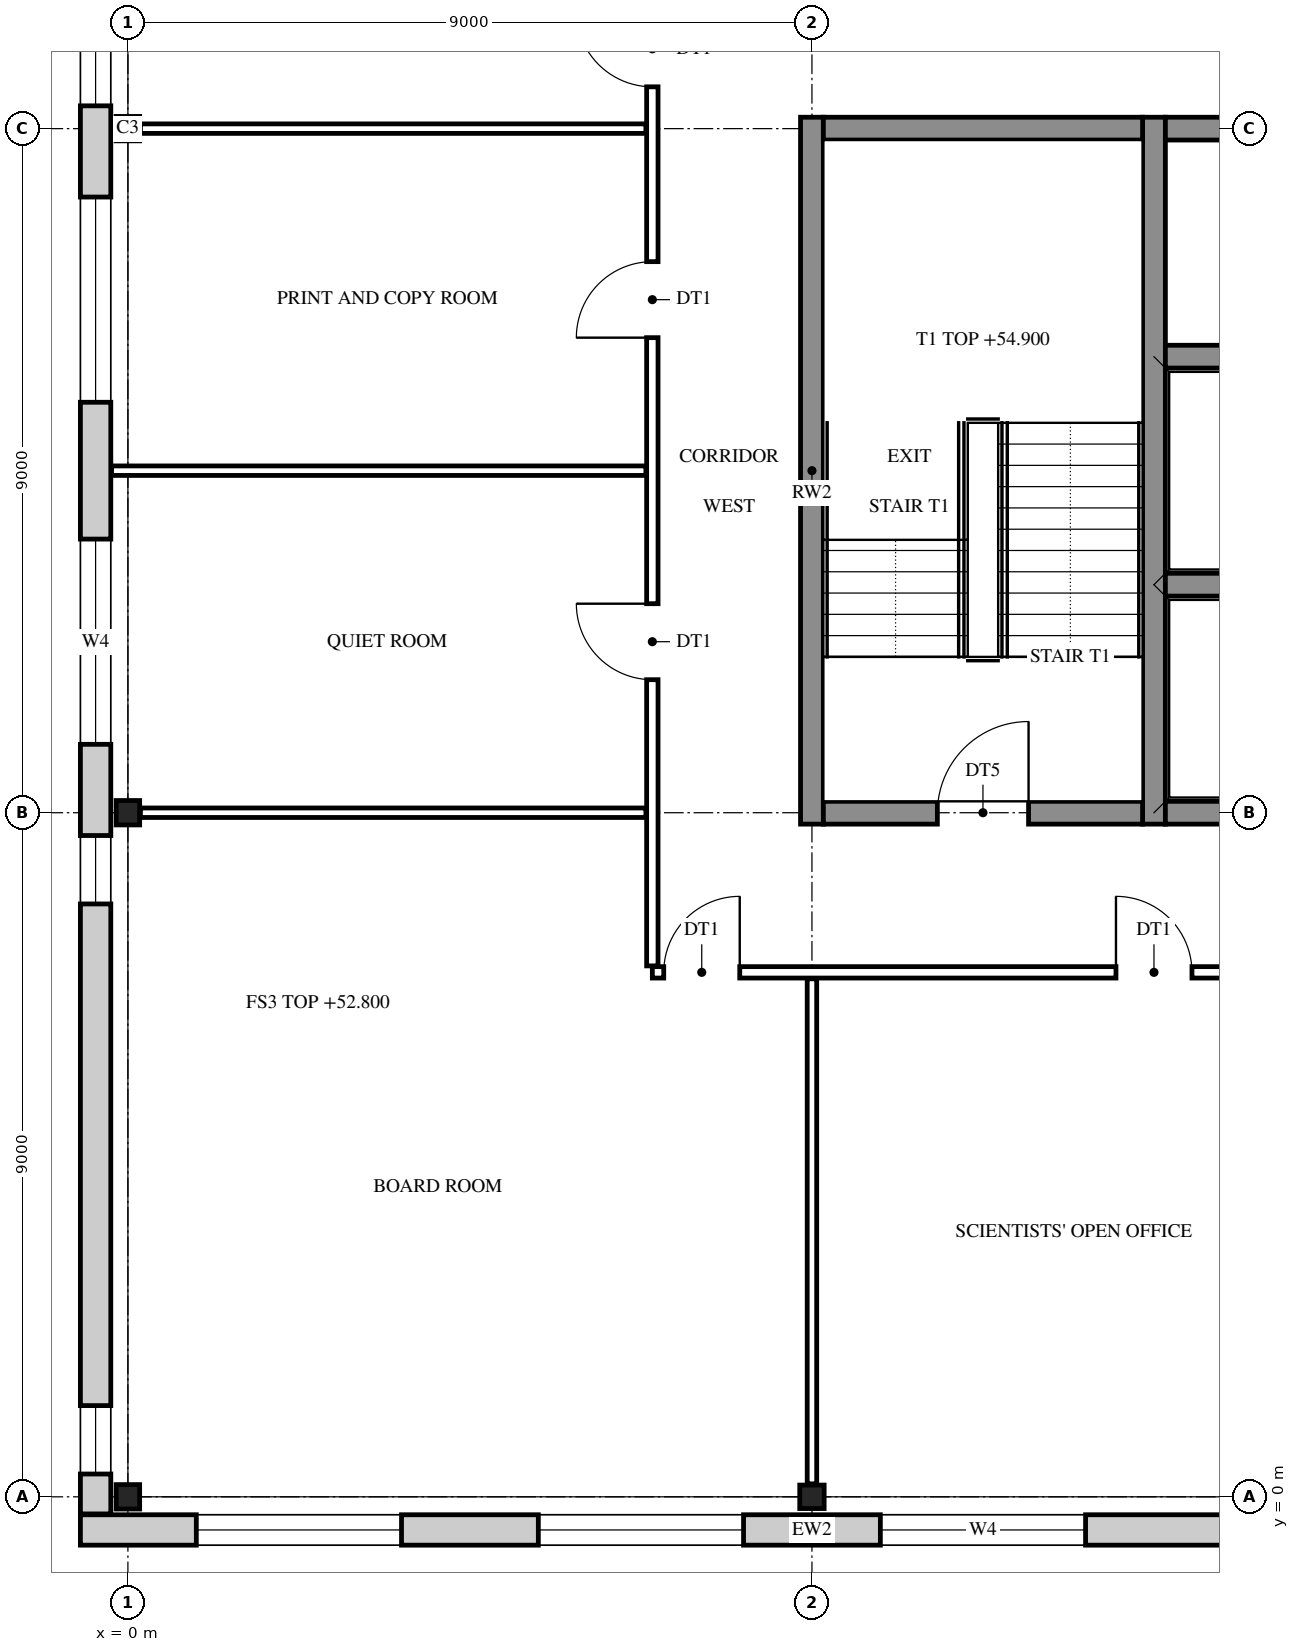
"""IFC4 building model, lengths in metres.
Left out: names, types, materials, properties, quantities, classifications, styles, units other than length and angle.
Written with IfcOpenShell. Run it as: python <this file> out.ifc"""

import sys

from ifc_helpers import new_model, si_unit, direction, frame, frame_2d, origin, origin_2d, place, context, subcontext, project, spatial, rectangle, i_section, extrude, element, fill, save


model = new_model("IFC4")
c1 = context("Model", 3, precision=1e-05, world=origin(), true_north=direction((0.0, 1.0)))
c2 = subcontext(c1, "Body", "Model", "MODEL_VIEW")
j1 = project(units=[si_unit("LENGTHUNIT", "METRE"), si_unit("PLANEANGLEUNIT", "RADIAN")], contexts=[c1])
p1 = place(None, origin())
s1 = spatial("IfcSite", under=j1, at=p1, CompositionType="ELEMENT")
p2 = place(p1, origin())
s2 = spatial("IfcBuilding", under=s1, at=p2, CompositionType="ELEMENT")
p3 = place(p2, frame((0.0, 0.0, 52.8)))
s3 = spatial("IfcBuildingStorey", under=s2, at=p3, CompositionType="ELEMENT", Elevation=52.8)
for number, where, z_axis, x_axis in (
    (1, (0.0, 0.0, 0.0), (0.0, 0.0, 1.0), (1.0, 0.0, 0.0)),
    (2, (0.0, 9.0, 0.0), (0.0, 0.0, 1.0), (1.0, 0.0, 0.0)),
    (3, (0.0, 18.0, 0.0), (0.0, 0.0, 1.0), (1.0, 0.0, 0.0)),
    (4, (9.0, 0.0, 0.0), (0.0, 0.0, 1.0), (0.0, 1.0, 0.0)),
):
    element("IfcColumn", number, at=place(p3, frame(where, z_axis=z_axis, x_axis=x_axis)), inside=s3, PredefinedType="COLUMN", context=c2, shape_type="SweptSolid", body=[
        extrude(i_section(OverallWidth=0.309, OverallDepth=0.321, WebThickness=0.014, FlangeThickness=0.022, FilletRadius=0.017, at=origin_2d()), origin(), (0.0, 0.0, 1.0), 4.2),
    ])
for number, where, z_axis, x_axis in (
    (5, (9.0, 8.85, 0.0), (0.0, 0.0, 1.0), (0.0, 1.0, 0.0)),
    (6, (13.5, 8.85, 0.0), (0.0, 0.0, 1.0), (0.0, 1.0, 0.0)),
):
    element("IfcWall", number, at=place(p3, frame(where, z_axis=z_axis, x_axis=x_axis)), inside=s3, PredefinedType="SHEAR", context=c2, shape_type="SweptSolid", body=[
        extrude(rectangle(XDim=9.3, YDim=0.3, at=frame_2d((4.65, 0.0))), origin(), (0.0, 0.0, 1.0), 4.2),
    ])
p4 = place(p3, frame((9.15, 9.0, 0.0), z_axis=(0.0, 0.0, 1.0), x_axis=(1.0, 0.0, 0.0)))
e7 = element("IfcWall", 7, at=p4, inside=s3, PredefinedType="SHEAR", context=c2, shape_type="SweptSolid", body=[
    extrude(rectangle(XDim=4.2, YDim=0.3, at=frame_2d((2.1, 0.0))), origin(), (0.0, 0.0, 1.0), 4.2),
])
p5 = place(p4, frame((1.5, 0.0, 0.0)))
e8 = element("IfcOpeningElement", 8, at=p5, cuts=e7, PredefinedType="OPENING", context=c2, shape_type="SweptSolid", body=[
    extrude(rectangle(XDim=1.2, YDim=2.1, at=frame_2d((0.6, 1.05))), frame((0.0, 0.16, 0.0), z_axis=(0.0, -1.0, 0.0), x_axis=(1.0, 0.0, 0.0)), (0.0, 0.0, 1.0), 0.32),
])
for number, where, z_axis, x_axis in (
    (9, (13.65, 9.0, 0.0), (0.0, 0.0, 1.0), (1.0, 0.0, 0.0)),
    (10, (13.65, 12.0, 0.0), (0.0, 0.0, 1.0), (1.0, 0.0, 0.0)),
    (11, (13.65, 15.0, 0.0), (0.0, 0.0, 1.0), (1.0, 0.0, 0.0)),
):
    element("IfcWall", number, at=place(p3, frame(where, z_axis=z_axis, x_axis=x_axis)), inside=s3, PredefinedType="SHEAR", context=c2, shape_type="SweptSolid", body=[
        extrude(rectangle(XDim=2.7, YDim=0.3, at=frame_2d((1.35, 0.0))), origin(), (0.0, 0.0, 1.0), 4.2),
    ])
p6 = place(p3, frame((9.15, 18.0, 0.0), z_axis=(0.0, 0.0, 1.0), x_axis=(1.0, 0.0, 0.0)))
e12 = element("IfcWall", 12, at=p6, inside=s3, PredefinedType="SHEAR", context=c2, shape_type="SweptSolid", body=[
    extrude(rectangle(XDim=4.2, YDim=0.3, at=frame_2d((2.1, 0.0))), origin(), (0.0, 0.0, 1.0), 4.2),
])
p7 = place(p3, frame((13.65, 18.0, 0.0), z_axis=(0.0, 0.0, 1.0), x_axis=(1.0, 0.0, 0.0)))
e13 = element("IfcWall", 13, at=p7, inside=s3, PredefinedType="SHEAR", context=c2, shape_type="SweptSolid", body=[
    extrude(rectangle(XDim=2.7, YDim=0.3, at=frame_2d((1.35, 0.0))), origin(), (0.0, 0.0, 1.0), 4.2),
])
p8 = place(p3, frame((32.125, -0.436, 0.0), z_axis=(0.0, 0.0, 1.0), x_axis=(-1.0, 0.0, 0.0)))
e14 = element("IfcWall", 14, at=p8, inside=s3, PredefinedType="STANDARD", context=c2, shape_type="SweptSolid", body=[
    extrude(rectangle(XDim=32.75, YDim=0.4, at=frame_2d((16.375, 0.0))), origin(), (0.0, 0.0, 1.0), 4.2),
])
p9 = place(p8, frame((28.525, 0.0, 0.9)))
e15 = element("IfcOpeningElement", 15, at=p9, cuts=e14, PredefinedType="OPENING", context=c2, shape_type="SweptSolid", body=[
    extrude(rectangle(XDim=2.7, YDim=2.5, at=frame_2d((1.35, 1.25))), frame((0.0, 0.21, 0.0), z_axis=(0.0, -1.0, 0.0), x_axis=(1.0, 0.0, 0.0)), (0.0, 0.0, 1.0), 0.42),
])
p10 = place(p8, frame((24.025, 0.0, 0.9)))
e16 = element("IfcOpeningElement", 16, at=p10, cuts=e14, PredefinedType="OPENING", context=c2, shape_type="SweptSolid", body=[
    extrude(rectangle(XDim=2.7, YDim=2.5, at=frame_2d((1.35, 1.25))), frame((0.0, 0.21, 0.0), z_axis=(0.0, -1.0, 0.0), x_axis=(1.0, 0.0, 0.0)), (0.0, 0.0, 1.0), 0.42),
])
p11 = place(p8, frame((19.525, 0.0, 0.9)))
e17 = element("IfcOpeningElement", 17, at=p11, cuts=e14, PredefinedType="OPENING", context=c2, shape_type="SweptSolid", body=[
    extrude(rectangle(XDim=2.7, YDim=2.5, at=frame_2d((1.35, 1.25))), frame((0.0, 0.21, 0.0), z_axis=(0.0, -1.0, 0.0), x_axis=(1.0, 0.0, 0.0)), (0.0, 0.0, 1.0), 0.42),
])
p12 = place(p8, frame((15.025, 0.0, 0.9)))
e18 = element("IfcOpeningElement", 18, at=p12, cuts=e14, PredefinedType="OPENING", context=c2, shape_type="SweptSolid", body=[
    extrude(rectangle(XDim=2.7, YDim=2.5, at=frame_2d((1.35, 1.25))), frame((0.0, 0.21, 0.0), z_axis=(0.0, -1.0, 0.0), x_axis=(1.0, 0.0, 0.0)), (0.0, 0.0, 1.0), 0.42),
])
p13 = place(p8, frame((10.525, 0.0, 0.9)))
e19 = element("IfcOpeningElement", 19, at=p13, cuts=e14, PredefinedType="OPENING", context=c2, shape_type="SweptSolid", body=[
    extrude(rectangle(XDim=2.7, YDim=2.5, at=frame_2d((1.35, 1.25))), frame((0.0, 0.21, 0.0), z_axis=(0.0, -1.0, 0.0), x_axis=(1.0, 0.0, 0.0)), (0.0, 0.0, 1.0), 0.42),
])
p14 = place(p8, frame((6.025, 0.0, 0.9)))
e20 = element("IfcOpeningElement", 20, at=p14, cuts=e14, PredefinedType="OPENING", context=c2, shape_type="SweptSolid", body=[
    extrude(rectangle(XDim=2.7, YDim=2.5, at=frame_2d((1.35, 1.25))), frame((0.0, 0.21, 0.0), z_axis=(0.0, -1.0, 0.0), x_axis=(1.0, 0.0, 0.0)), (0.0, 0.0, 1.0), 0.42),
])
p15 = place(p8, frame((1.525, 0.0, 0.9)))
e21 = element("IfcOpeningElement", 21, at=p15, cuts=e14, PredefinedType="OPENING", context=c2, shape_type="SweptSolid", body=[
    extrude(rectangle(XDim=2.7, YDim=2.5, at=frame_2d((1.35, 1.25))), frame((0.0, 0.21, 0.0), z_axis=(0.0, -1.0, 0.0), x_axis=(1.0, 0.0, 0.0)), (0.0, 0.0, 1.0), 0.42),
])
p16 = place(p3, frame((-0.425, -0.225, 0.0), z_axis=(0.0, 0.0, 1.0), x_axis=(0.0, 1.0, 0.0)))
e22 = element("IfcWall", 22, at=p16, inside=s3, PredefinedType="STANDARD", context=c2, shape_type="SweptSolid", body=[
    extrude(rectangle(XDim=27.45, YDim=0.4, at=frame_2d((13.725, 0.0))), origin(), (0.0, 0.0, 1.0), 4.2),
])
p17 = place(p16, frame((0.525, 0.0, 0.9)))
e23 = element("IfcOpeningElement", 23, at=p17, cuts=e22, PredefinedType="OPENING", context=c2, shape_type="SweptSolid", body=[
    extrude(rectangle(XDim=0.9, YDim=2.0, at=frame_2d((0.45, 1.0))), frame((0.0, 0.21, 0.0), z_axis=(0.0, -1.0, 0.0), x_axis=(1.0, 0.0, 0.0)), (0.0, 0.0, 1.0), 0.42),
])
p18 = place(p16, frame((8.025, 0.0, 0.9)))
e24 = element("IfcOpeningElement", 24, at=p18, cuts=e22, PredefinedType="OPENING", context=c2, shape_type="SweptSolid", body=[
    extrude(rectangle(XDim=0.9, YDim=2.0, at=frame_2d((0.45, 1.0))), frame((0.0, 0.21, 0.0), z_axis=(0.0, -1.0, 0.0), x_axis=(1.0, 0.0, 0.0)), (0.0, 0.0, 1.0), 0.42),
])
p19 = place(p16, frame((10.125, 0.0, 0.9)))
e25 = element("IfcOpeningElement", 25, at=p19, cuts=e22, PredefinedType="OPENING", context=c2, shape_type="SweptSolid", body=[
    extrude(rectangle(XDim=2.7, YDim=2.5, at=frame_2d((1.35, 1.25))), frame((0.0, 0.21, 0.0), z_axis=(0.0, -1.0, 0.0), x_axis=(1.0, 0.0, 0.0)), (0.0, 0.0, 1.0), 0.42),
])
p20 = place(p16, frame((14.625, 0.0, 0.9)))
e26 = element("IfcOpeningElement", 26, at=p20, cuts=e22, PredefinedType="OPENING", context=c2, shape_type="SweptSolid", body=[
    extrude(rectangle(XDim=2.7, YDim=2.5, at=frame_2d((1.35, 1.25))), frame((0.0, 0.21, 0.0), z_axis=(0.0, -1.0, 0.0), x_axis=(1.0, 0.0, 0.0)), (0.0, 0.0, 1.0), 0.42),
])
p21 = place(p16, frame((18.525, 0.0, 0.9)))
e27 = element("IfcOpeningElement", 27, at=p21, cuts=e22, PredefinedType="OPENING", context=c2, shape_type="SweptSolid", body=[
    extrude(rectangle(XDim=0.9, YDim=2.0, at=frame_2d((0.45, 1.0))), frame((0.0, 0.21, 0.0), z_axis=(0.0, -1.0, 0.0), x_axis=(1.0, 0.0, 0.0)), (0.0, 0.0, 1.0), 0.42),
])
p22 = place(p16, frame((26.025, 0.0, 0.9)))
e28 = element("IfcOpeningElement", 28, at=p22, cuts=e22, PredefinedType="OPENING", context=c2, shape_type="SweptSolid", body=[
    extrude(rectangle(XDim=0.9, YDim=2.0, at=frame_2d((0.45, 1.0))), frame((0.0, 0.21, 0.0), z_axis=(0.0, -1.0, 0.0), x_axis=(1.0, 0.0, 0.0)), (0.0, 0.0, 1.0), 0.42),
])
p23 = place(p3, frame((6.9, 6.985, 0.0), z_axis=(0.0, 0.0, 1.0), x_axis=(0.0, 1.0, 0.0)))
e29 = element("IfcWall", 29, at=p23, inside=s3, PredefinedType="PARTITIONING", context=c2, shape_type="SweptSolid", body=[
    extrude(rectangle(XDim=13.03, YDim=0.15, at=frame_2d((6.515, 0.0))), origin(), (0.0, 0.0, 1.0), 3.542),
])
p24 = place(p23, frame((11.565, 0.0, 0.0)))
e30 = element("IfcOpeningElement", 30, at=p24, cuts=e29, PredefinedType="OPENING", context=c2, shape_type="SweptSolid", body=[
    extrude(rectangle(XDim=1.0, YDim=2.1, at=frame_2d((0.5, 1.05))), frame((0.0, 0.085, 0.0), z_axis=(0.0, -1.0, 0.0), x_axis=(1.0, 0.0, 0.0)), (0.0, 0.0, 1.0), 0.17),
])
p25 = place(p23, frame((3.765, 0.0, 0.0)))
e31 = element("IfcOpeningElement", 31, at=p25, cuts=e29, PredefinedType="OPENING", context=c2, shape_type="SweptSolid", body=[
    extrude(rectangle(XDim=1.0, YDim=2.1, at=frame_2d((0.5, 1.05))), frame((0.0, 0.085, 0.0), z_axis=(0.0, -1.0, 0.0), x_axis=(1.0, 0.0, 0.0)), (0.0, 0.0, 1.0), 0.17),
])
p26 = place(p23, frame((8.265, 0.0, 0.0)))
e32 = element("IfcOpeningElement", 32, at=p26, cuts=e29, PredefinedType="OPENING", context=c2, shape_type="SweptSolid", body=[
    extrude(rectangle(XDim=1.0, YDim=2.1, at=frame_2d((0.5, 1.05))), frame((0.0, 0.085, 0.0), z_axis=(0.0, -1.0, 0.0), x_axis=(1.0, 0.0, 0.0)), (0.0, 0.0, 1.0), 0.17),
])
p27 = place(p3, frame((9.0, 0.17, 0.0), z_axis=(0.0, 0.0, 1.0), x_axis=(0.0, 1.0, 0.0)))
e33 = element("IfcWall", 33, at=p27, inside=s3, PredefinedType="PARTITIONING", context=c2, shape_type="SweptSolid", body=[
    extrude(rectangle(XDim=6.645, YDim=0.125, at=frame_2d((3.322, 0.0))), origin(), (0.0, 0.0, 1.0), 3.542),
])
p28 = place(p3, frame((6.9, 6.9, 0.0), z_axis=(0.0, 0.0, 1.0), x_axis=(1.0, 0.0, 0.0)))
e34 = element("IfcWall", 34, at=p28, inside=s3, PredefinedType="PARTITIONING", context=c2, shape_type="SweptSolid", body=[
    extrude(rectangle(XDim=20.1, YDim=0.15, at=frame_2d((10.05, 0.0))), origin(), (0.0, 0.0, 1.0), 3.542),
])
p29 = place(p28, frame((0.15, 0.0, 0.0)))
e35 = element("IfcOpeningElement", 35, at=p29, cuts=e34, PredefinedType="OPENING", context=c2, shape_type="SweptSolid", body=[
    extrude(rectangle(XDim=1.0, YDim=2.1, at=frame_2d((0.5, 1.05))), frame((0.0, 0.085, 0.0), z_axis=(0.0, -1.0, 0.0), x_axis=(1.0, 0.0, 0.0)), (0.0, 0.0, 1.0), 0.17),
])
p30 = place(p28, frame((6.1, 0.0, 0.0)))
e36 = element("IfcOpeningElement", 36, at=p30, cuts=e34, PredefinedType="OPENING", context=c2, shape_type="SweptSolid", body=[
    extrude(rectangle(XDim=1.0, YDim=2.1, at=frame_2d((0.5, 1.05))), frame((0.0, 0.085, 0.0), z_axis=(0.0, -1.0, 0.0), x_axis=(1.0, 0.0, 0.0)), (0.0, 0.0, 1.0), 0.17),
])
p31 = place(p28, frame((16.3, 0.0, 0.0)))
e37 = element("IfcOpeningElement", 37, at=p31, cuts=e34, PredefinedType="OPENING", context=c2, shape_type="SweptSolid", body=[
    extrude(rectangle(XDim=1.0, YDim=2.1, at=frame_2d((0.5, 1.05))), frame((0.0, 0.085, 0.0), z_axis=(0.0, -1.0, 0.0), x_axis=(1.0, 0.0, 0.0)), (0.0, 0.0, 1.0), 0.17),
])
p32 = place(p3, frame((0.165, 9.0, 0.0), z_axis=(0.0, 0.0, 1.0), x_axis=(1.0, 0.0, 0.0)))
e38 = element("IfcWall", 38, at=p32, inside=s3, PredefinedType="PARTITIONING", context=c2, shape_type="SweptSolid", body=[
    extrude(rectangle(XDim=6.65, YDim=0.125, at=frame_2d((3.325, 0.0))), origin(), (0.0, 0.0, 1.0), 3.542),
])
p33 = place(p3, frame((-0.215, 13.5, 0.0), z_axis=(0.0, 0.0, 1.0), x_axis=(1.0, 0.0, 0.0)))
e39 = element("IfcWall", 39, at=p33, inside=s3, PredefinedType="PARTITIONING", context=c2, shape_type="SweptSolid", body=[
    extrude(rectangle(XDim=7.03, YDim=0.125, at=frame_2d((3.515, 0.0))), origin(), (0.0, 0.0, 1.0), 3.542),
])
p34 = place(p3, frame((0.165, 18.0, 0.0), z_axis=(0.0, 0.0, 1.0), x_axis=(1.0, 0.0, 0.0)))
e40 = element("IfcWall", 40, at=p34, inside=s3, PredefinedType="PARTITIONING", context=c2, shape_type="SweptSolid", body=[
    extrude(rectangle(XDim=6.65, YDim=0.125, at=frame_2d((3.325, 0.0))), origin(), (0.0, 0.0, 1.0), 3.542),
])
p35 = place(p9, origin())
e41 = element("IfcWindow", 41, at=p35, inside=s3, PartitioningType="SINGLE_PANEL", PredefinedType="WINDOW", context=c2, shape_type="SweptSolid", body=[
    extrude(rectangle(XDim=2.7, YDim=2.5, at=frame_2d((1.35, 1.25))), frame((0.0, 0.03, 0.0), z_axis=(0.0, -1.0, 0.0), x_axis=(1.0, 0.0, 0.0)), (0.0, 0.0, 1.0), 0.06),
])
fill(e15, e41)
p36 = place(p10, origin())
e42 = element("IfcWindow", 42, at=p36, inside=s3, PartitioningType="SINGLE_PANEL", PredefinedType="WINDOW", context=c2, shape_type="SweptSolid", body=[
    extrude(rectangle(XDim=2.7, YDim=2.5, at=frame_2d((1.35, 1.25))), frame((0.0, 0.03, 0.0), z_axis=(0.0, -1.0, 0.0), x_axis=(1.0, 0.0, 0.0)), (0.0, 0.0, 1.0), 0.06),
])
fill(e16, e42)
p37 = place(p11, origin())
e43 = element("IfcWindow", 43, at=p37, inside=s3, PartitioningType="SINGLE_PANEL", PredefinedType="WINDOW", context=c2, shape_type="SweptSolid", body=[
    extrude(rectangle(XDim=2.7, YDim=2.5, at=frame_2d((1.35, 1.25))), frame((0.0, 0.03, 0.0), z_axis=(0.0, -1.0, 0.0), x_axis=(1.0, 0.0, 0.0)), (0.0, 0.0, 1.0), 0.06),
])
fill(e17, e43)
p38 = place(p17, origin())
e44 = element("IfcWindow", 44, at=p38, inside=s3, PartitioningType="SINGLE_PANEL", PredefinedType="WINDOW", context=c2, shape_type="SweptSolid", body=[
    extrude(rectangle(XDim=0.9, YDim=2.0, at=frame_2d((0.45, 1.0))), frame((0.0, 0.03, 0.0), z_axis=(0.0, -1.0, 0.0), x_axis=(1.0, 0.0, 0.0)), (0.0, 0.0, 1.0), 0.06),
])
fill(e23, e44)
p39 = place(p18, origin())
e45 = element("IfcWindow", 45, at=p39, inside=s3, PartitioningType="SINGLE_PANEL", PredefinedType="WINDOW", context=c2, shape_type="SweptSolid", body=[
    extrude(rectangle(XDim=0.9, YDim=2.0, at=frame_2d((0.45, 1.0))), frame((0.0, 0.03, 0.0), z_axis=(0.0, -1.0, 0.0), x_axis=(1.0, 0.0, 0.0)), (0.0, 0.0, 1.0), 0.06),
])
fill(e24, e45)
p40 = place(p19, origin())
e46 = element("IfcWindow", 46, at=p40, inside=s3, PartitioningType="SINGLE_PANEL", PredefinedType="WINDOW", context=c2, shape_type="SweptSolid", body=[
    extrude(rectangle(XDim=2.7, YDim=2.5, at=frame_2d((1.35, 1.25))), frame((0.0, 0.03, 0.0), z_axis=(0.0, -1.0, 0.0), x_axis=(1.0, 0.0, 0.0)), (0.0, 0.0, 1.0), 0.06),
])
fill(e25, e46)
p41 = place(p20, origin())
e47 = element("IfcWindow", 47, at=p41, inside=s3, PartitioningType="SINGLE_PANEL", PredefinedType="WINDOW", context=c2, shape_type="SweptSolid", body=[
    extrude(rectangle(XDim=2.7, YDim=2.5, at=frame_2d((1.35, 1.25))), frame((0.0, 0.03, 0.0), z_axis=(0.0, -1.0, 0.0), x_axis=(1.0, 0.0, 0.0)), (0.0, 0.0, 1.0), 0.06),
])
fill(e26, e47)
p42 = place(p21, origin())
e48 = element("IfcWindow", 48, at=p42, inside=s3, PartitioningType="SINGLE_PANEL", PredefinedType="WINDOW", context=c2, shape_type="SweptSolid", body=[
    extrude(rectangle(XDim=0.9, YDim=2.0, at=frame_2d((0.45, 1.0))), frame((0.0, 0.03, 0.0), z_axis=(0.0, -1.0, 0.0), x_axis=(1.0, 0.0, 0.0)), (0.0, 0.0, 1.0), 0.06),
])
fill(e27, e48)
p43 = place(p5, origin())
e49 = element("IfcDoor", 49, at=p43, inside=s3, OperationType="SINGLE_SWING_RIGHT", PredefinedType="DOOR", context=c2, shape_type="SweptSolid", body=[
    extrude(rectangle(XDim=1.2, YDim=2.1, at=frame_2d((0.6, 1.05))), frame((0.0, 0.025, 0.0), z_axis=(0.0, -1.0, 0.0), x_axis=(1.0, 0.0, 0.0)), (0.0, 0.0, 1.0), 0.05),
])
fill(e8, e49)
p44 = place(p29, frame((1.0, 0.0, 0.0), z_axis=(0.0, 0.0, 1.0), x_axis=(-1.0, 0.0, 0.0)))
e50 = element("IfcDoor", 50, at=p44, inside=s3, OperationType="SINGLE_SWING_RIGHT", PredefinedType="DOOR", context=c2, shape_type="SweptSolid", body=[
    extrude(rectangle(XDim=1.0, YDim=2.1, at=frame_2d((0.5, 1.05))), frame((0.0, 0.025, 0.0), z_axis=(0.0, -1.0, 0.0), x_axis=(1.0, 0.0, 0.0)), (0.0, 0.0, 1.0), 0.05),
])
fill(e35, e50)
p45 = place(p30, frame((1.0, 0.0, 0.0), z_axis=(0.0, 0.0, 1.0), x_axis=(-1.0, 0.0, 0.0)))
e51 = element("IfcDoor", 51, at=p45, inside=s3, OperationType="SINGLE_SWING_LEFT", PredefinedType="DOOR", context=c2, shape_type="SweptSolid", body=[
    extrude(rectangle(XDim=1.0, YDim=2.1, at=frame_2d((0.5, 1.05))), frame((0.0, 0.025, 0.0), z_axis=(0.0, -1.0, 0.0), x_axis=(1.0, 0.0, 0.0)), (0.0, 0.0, 1.0), 0.05),
])
fill(e36, e51)
p46 = place(p24, origin())
e52 = element("IfcDoor", 52, at=p46, inside=s3, OperationType="SINGLE_SWING_RIGHT", PredefinedType="DOOR", context=c2, shape_type="SweptSolid", body=[
    extrude(rectangle(XDim=1.0, YDim=2.1, at=frame_2d((0.5, 1.05))), frame((0.0, 0.025, 0.0), z_axis=(0.0, -1.0, 0.0), x_axis=(1.0, 0.0, 0.0)), (0.0, 0.0, 1.0), 0.05),
])
fill(e30, e52)
p47 = place(p25, origin())
e53 = element("IfcDoor", 53, at=p47, inside=s3, OperationType="SINGLE_SWING_RIGHT", PredefinedType="DOOR", context=c2, shape_type="SweptSolid", body=[
    extrude(rectangle(XDim=1.0, YDim=2.1, at=frame_2d((0.5, 1.05))), frame((0.0, 0.025, 0.0), z_axis=(0.0, -1.0, 0.0), x_axis=(1.0, 0.0, 0.0)), (0.0, 0.0, 1.0), 0.05),
])
fill(e31, e53)
p48 = place(p26, origin())
e54 = element("IfcDoor", 54, at=p48, inside=s3, OperationType="SINGLE_SWING_LEFT", PredefinedType="DOOR", context=c2, shape_type="SweptSolid", body=[
    extrude(rectangle(XDim=1.0, YDim=2.1, at=frame_2d((0.5, 1.05))), frame((0.0, 0.025, 0.0), z_axis=(0.0, -1.0, 0.0), x_axis=(1.0, 0.0, 0.0)), (0.0, 0.0, 1.0), 0.05),
])
fill(e32, e54)
save(model, sys.argv[1])
